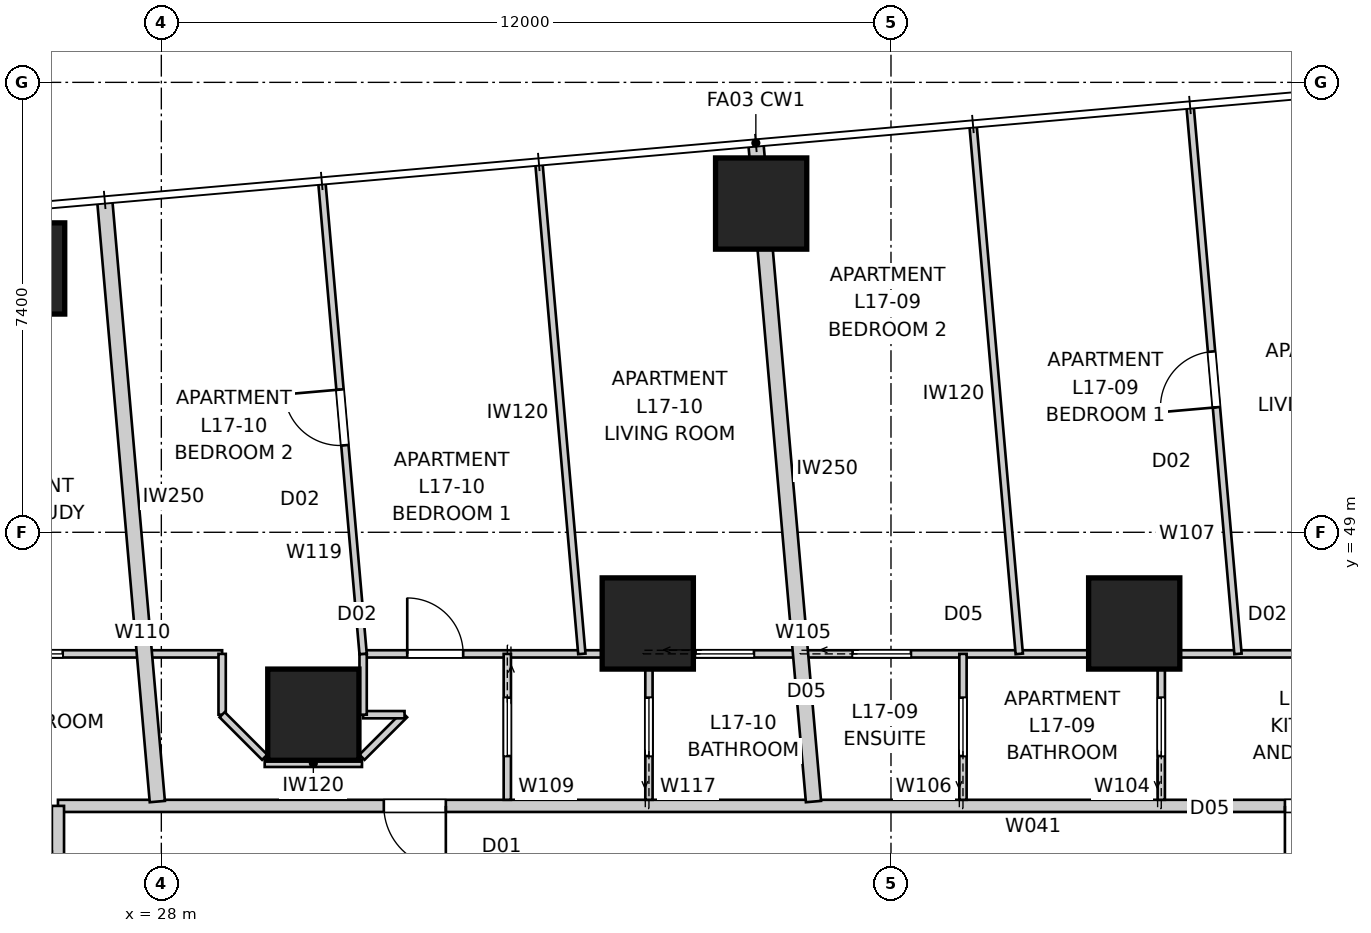
"""IFC4 building model, lengths in metres.
Left out: names, types, materials, properties, quantities, classifications, styles, units other than length and angle.
Written with IfcOpenShell. Run it as: python <this file> out.ifc"""

import sys

from ifc_helpers import new_model, si_unit, direction, frame, frame_2d, origin, origin_2d, place, context, subcontext, project, spatial, rectangle, extrude, element, fill, save


model = new_model("IFC4")
c1 = context("Model", 3, precision=1e-05, world=origin(), true_north=direction((0.0, 1.0)))
c2 = subcontext(c1, "Body", "Model", "MODEL_VIEW")
j1 = project(units=[si_unit("LENGTHUNIT", "METRE"), si_unit("PLANEANGLEUNIT", "RADIAN")], contexts=[c1])
p1 = place(None, origin())
s1 = spatial("IfcSite", under=j1, at=p1, CompositionType="ELEMENT")
p2 = place(p1, origin())
s2 = spatial("IfcBuilding", under=s1, at=p2, CompositionType="ELEMENT")
p3 = place(p2, frame((0.0, 0.0, 64.2)))
s3 = spatial("IfcBuildingStorey", under=s2, at=p3, CompositionType="ELEMENT", Elevation=64.2)
for number, where, z_axis, x_axis in (
    (1, (37.865, 54.407, 0.0), (0.0, 0.0, 1.0), (1.0, 0.0, 0.0)),
    (2, (25.661, 53.339, 0.0), (0.0, 0.0, 1.0), (1.0, 0.0, 0.0)),
    (3, (44.0, 47.5, 0.0), (0.0, 0.0, 1.0), (1.0, 0.0, 0.0)),
    (4, (36.0, 47.5, 0.0), (0.0, 0.0, 1.0), (1.0, 0.0, 0.0)),
    (5, (30.5, 46.0, 0.0), (0.0, 0.0, 1.0), (1.0, 0.0, 0.0)),
):
    element("IfcColumn", number, at=place(p3, frame(where, z_axis=z_axis, x_axis=x_axis)), inside=s3, PredefinedType="COLUMN", context=c2, shape_type="SweptSolid", body=[
        extrude(rectangle(XDim=1.5, YDim=1.5, at=origin_2d()), origin(), (0.0, 0.0, 1.0), 3.4),
    ])
p4 = place(p3, frame((53.7, 44.5, 0.0), z_axis=(0.0, 0.0, 1.0), x_axis=(-1.0, 0.0, 0.0)))
e6 = element("IfcWall", 6, at=p4, inside=s3, PredefinedType="PARTITIONING", context=c2, shape_type="SweptSolid", body=[
    extrude(rectangle(XDim=27.4, YDim=0.2, at=frame_2d((13.7, 0.0))), origin(), (0.0, 0.0, 1.0), 3.25),
])
p5 = place(p4, frame((21.021, 0.0, 0.0)))
e7 = element("IfcOpeningElement", 7, at=p5, cuts=e6, PredefinedType="OPENING", context=c2, shape_type="SweptSolid", body=[
    extrude(rectangle(XDim=1.02, YDim=2.34, at=frame_2d((0.51, 1.17))), frame((0.0, 0.11, 0.0), z_axis=(0.0, -1.0, 0.0), x_axis=(1.0, 0.0, 0.0)), (0.0, 0.0, 1.0), 0.22),
])
p6 = place(p4, frame((6.201, 0.0, 0.0)))
e8 = element("IfcOpeningElement", 8, at=p6, cuts=e6, PredefinedType="OPENING", context=c2, shape_type="SweptSolid", body=[
    extrude(rectangle(XDim=1.02, YDim=2.34, at=frame_2d((0.51, 1.17))), frame((0.0, 0.11, 0.0), z_axis=(0.0, -1.0, 0.0), x_axis=(1.0, 0.0, 0.0)), (0.0, 0.0, 1.0), 0.22),
])
p7 = place(p3, frame((26.3, 44.5, 0.0), z_axis=(0.0, 0.0, 1.0), x_axis=(0.0, -1.0, 0.0)))
e9 = element("IfcWall", 9, at=p7, inside=s3, PredefinedType="PARTITIONING", context=c2, shape_type="SweptSolid", body=[
    extrude(rectangle(XDim=29.0, YDim=0.2, at=frame_2d((14.5, 0.0))), origin(), (0.0, 0.0, 1.0), 3.25),
])
p8 = place(p7, frame((6.85, 0.0, 0.0)))
e10 = element("IfcOpeningElement", 10, at=p8, cuts=e9, PredefinedType="OPENING", context=c2, shape_type="SweptSolid", body=[
    extrude(rectangle(XDim=1.02, YDim=2.34, at=frame_2d((0.51, 1.17))), frame((0.0, 0.11, 0.0), z_axis=(0.0, -1.0, 0.0), x_axis=(1.0, 0.0, 0.0)), (0.0, 0.0, 1.0), 0.22),
])
p9 = place(p7, frame((2.345, 0.0, 0.0)))
e11 = element("IfcOpeningElement", 11, at=p9, cuts=e9, PredefinedType="OPENING", context=c2, shape_type="SweptSolid", body=[
    extrude(rectangle(XDim=1.02, YDim=2.1, at=frame_2d((0.51, 1.05))), frame((0.0, 0.11, 0.0), z_axis=(0.0, -1.0, 0.0), x_axis=(1.0, 0.0, 0.0)), (0.0, 0.0, 1.0), 0.22),
])
p10 = place(p7, frame((17.166, 0.0, 0.0)))
e12 = element("IfcOpeningElement", 12, at=p10, cuts=e9, PredefinedType="OPENING", context=c2, shape_type="SweptSolid", body=[
    extrude(rectangle(XDim=1.02, YDim=2.34, at=frame_2d((0.51, 1.17))), frame((0.0, 0.11, 0.0), z_axis=(0.0, -1.0, 0.0), x_axis=(1.0, 0.0, 0.0)), (0.0, 0.0, 1.0), 0.22),
])
p11 = place(p7, frame((27.055, 0.0, 0.0)))
e13 = element("IfcOpeningElement", 13, at=p11, cuts=e9, PredefinedType="OPENING", context=c2, shape_type="SweptSolid", body=[
    extrude(rectangle(XDim=1.02, YDim=2.34, at=frame_2d((0.51, 1.17))), frame((0.0, 0.11, 0.0), z_axis=(0.0, -1.0, 0.0), x_axis=(1.0, 0.0, 0.0)), (0.0, 0.0, 1.0), 0.22),
])
p12 = place(p3, frame((37.778, 55.403, 0.0), z_axis=(0.0, 0.0, 1.0), x_axis=(0.087140211333, -0.996196056792, 0.0)))
e14 = element("IfcWall", 14, at=p12, inside=s3, PredefinedType="PARTITIONING", context=c2, shape_type="SweptSolid", body=[
    extrude(rectangle(XDim=10.873, YDim=0.25, at=frame_2d((5.437, 0.0))), origin(), (0.0, 0.0, 1.0), 3.25),
])
p13 = place(p3, frame((27.068, 54.466, 0.0), z_axis=(0.0, 0.0, 1.0), x_axis=(0.087157803114, -0.996194517831, 0.0)))
e15 = element("IfcWall", 15, at=p13, inside=s3, PredefinedType="PARTITIONING", context=c2, shape_type="SweptSolid", body=[
    extrude(rectangle(XDim=9.933, YDim=0.25, at=frame_2d((4.966, 0.0))), origin(), (0.0, 0.0, 1.0), 3.25),
])
p14 = place(p3, frame((44.445, 44.6, 0.0), z_axis=(0.0, 0.0, 1.0), x_axis=(0.0, 1.0, 0.0)))
e16 = element("IfcWall", 16, at=p14, inside=s3, PredefinedType="PARTITIONING", context=c2, shape_type="SweptSolid", body=[
    extrude(rectangle(XDim=2.4, YDim=0.12, at=frame_2d((1.2, 0.0))), origin(), (0.0, 0.0, 1.0), 3.25),
])
p15 = place(p14, frame((0.72, 0.0, 0.0)))
e17 = element("IfcOpeningElement", 17, at=p15, cuts=e16, PredefinedType="OPENING", context=c2, shape_type="SweptSolid", body=[
    extrude(rectangle(XDim=0.96, YDim=2.1, at=frame_2d((0.48, 1.05))), frame((0.0, 0.07, 0.0), z_axis=(0.0, -1.0, 0.0), x_axis=(1.0, 0.0, 0.0)), (0.0, 0.0, 1.0), 0.14),
])
p16 = place(p3, frame((31.319, 47.0, 0.0), z_axis=(0.0, 0.0, 1.0), x_axis=(1.0, 0.0, 0.0)))
e18 = element("IfcWall", 18, at=p16, inside=s3, PredefinedType="PARTITIONING", context=c2, shape_type="SweptSolid", body=[
    extrude(rectangle(XDim=17.985, YDim=0.12, at=frame_2d((8.993, 0.0))), origin(), (0.0, 0.0, 1.0), 2.55),
])
p17 = place(p16, frame((0.726, 0.0, 0.0)))
e19 = element("IfcOpeningElement", 19, at=p17, cuts=e18, PredefinedType="OPENING", context=c2, shape_type="SweptSolid", body=[
    extrude(rectangle(XDim=0.92, YDim=2.34, at=frame_2d((0.46, 1.17))), frame((0.0, 0.07, 0.0), z_axis=(0.0, -1.0, 0.0), x_axis=(1.0, 0.0, 0.0)), (0.0, 0.0, 1.0), 0.14),
])
p18 = place(p16, frame((15.701, 0.0, 0.0)))
e20 = element("IfcOpeningElement", 20, at=p18, cuts=e18, PredefinedType="OPENING", context=c2, shape_type="SweptSolid", body=[
    extrude(rectangle(XDim=0.92, YDim=2.34, at=frame_2d((0.46, 1.17))), frame((0.0, 0.07, 0.0), z_axis=(0.0, -1.0, 0.0), x_axis=(1.0, 0.0, 0.0)), (0.0, 0.0, 1.0), 0.14),
])
p19 = place(p16, frame((5.467, 0.0, 0.0)))
e21 = element("IfcOpeningElement", 21, at=p19, cuts=e18, PredefinedType="OPENING", context=c2, shape_type="SweptSolid", body=[
    extrude(rectangle(XDim=0.96, YDim=2.1, at=frame_2d((0.48, 1.05))), frame((0.0, 0.07, 0.0), z_axis=(0.0, -1.0, 0.0), x_axis=(1.0, 0.0, 0.0)), (0.0, 0.0, 1.0), 0.14),
])
p20 = place(p16, frame((8.05, 0.0, 0.0)))
e22 = element("IfcOpeningElement", 22, at=p20, cuts=e18, PredefinedType="OPENING", context=c2, shape_type="SweptSolid", body=[
    extrude(rectangle(XDim=0.96, YDim=2.1, at=frame_2d((0.48, 1.05))), frame((0.0, 0.07, 0.0), z_axis=(0.0, -1.0, 0.0), x_axis=(1.0, 0.0, 0.0)), (0.0, 0.0, 1.0), 0.14),
])
p21 = place(p3, frame((41.184, 44.6, 0.0), z_axis=(0.0, 0.0, 1.0), x_axis=(0.0, 1.0, 0.0)))
e23 = element("IfcWall", 23, at=p21, inside=s3, PredefinedType="PARTITIONING", context=c2, shape_type="SweptSolid", body=[
    extrude(rectangle(XDim=2.4, YDim=0.12, at=frame_2d((1.2, 0.0))), origin(), (0.0, 0.0, 1.0), 3.25),
])
p22 = place(p21, frame((0.72, 0.0, 0.0)))
e24 = element("IfcOpeningElement", 24, at=p22, cuts=e23, PredefinedType="OPENING", context=c2, shape_type="SweptSolid", body=[
    extrude(rectangle(XDim=0.96, YDim=2.1, at=frame_2d((0.48, 1.05))), frame((0.0, 0.07, 0.0), z_axis=(0.0, -1.0, 0.0), x_axis=(1.0, 0.0, 0.0)), (0.0, 0.0, 1.0), 0.14),
])
p23 = place(p3, frame((45.707, 47.0, 0.0), z_axis=(0.0, 0.0, 1.0), x_axis=(-0.087160907995, 0.996194246178, 0.0)))
e25 = element("IfcWall", 25, at=p23, inside=s3, PredefinedType="PARTITIONING", context=c2, shape_type="SweptSolid", body=[
    extrude(rectangle(XDim=9.022, YDim=0.12, at=frame_2d((4.511, 0.0))), origin(), (0.0, 0.0, 1.0), 3.25),
])
p24 = place(p23, frame((4.071, 0.0, 0.0)))
e26 = element("IfcOpeningElement", 26, at=p24, cuts=e25, PredefinedType="OPENING", context=c2, shape_type="SweptSolid", body=[
    extrude(rectangle(XDim=0.92, YDim=2.34, at=frame_2d((0.46, 1.17))), frame((0.0, 0.07, 0.0), z_axis=(0.0, -1.0, 0.0), x_axis=(1.0, 0.0, 0.0)), (0.0, 0.0, 1.0), 0.14),
])
p25 = place(p3, frame((42.11, 47.0, 0.0), z_axis=(0.0, 0.0, 1.0), x_axis=(-0.087158256162, 0.996194478193, 0.0)))
e27 = element("IfcWall", 27, at=p25, inside=s3, PredefinedType="PARTITIONING", context=c2, shape_type="SweptSolid", body=[
    extrude(rectangle(XDim=8.709, YDim=0.12, at=frame_2d((4.354, 0.0))), origin(), (0.0, 0.0, 1.0), 3.25),
])
p26 = place(p3, frame((33.69, 47.0, 0.0), z_axis=(0.0, 0.0, 1.0), x_axis=(0.0, -1.0, 0.0)))
e28 = element("IfcWall", 28, at=p26, inside=s3, PredefinedType="PARTITIONING", context=c2, shape_type="SweptSolid", body=[
    extrude(rectangle(XDim=2.4, YDim=0.12, at=frame_2d((1.2, 0.0))), origin(), (0.0, 0.0, 1.0), 3.25),
])
p27 = place(p26, frame((0.72, 0.0, 0.0)))
e29 = element("IfcOpeningElement", 29, at=p27, cuts=e28, PredefinedType="OPENING", context=c2, shape_type="SweptSolid", body=[
    extrude(rectangle(XDim=0.96, YDim=2.1, at=frame_2d((0.48, 1.05))), frame((0.0, 0.07, 0.0), z_axis=(0.0, -1.0, 0.0), x_axis=(1.0, 0.0, 0.0)), (0.0, 0.0, 1.0), 0.14),
])
p28 = place(p3, frame((23.8, 47.0, 0.0), z_axis=(0.0, 0.0, 1.0), x_axis=(1.0, 0.0, 0.0)))
e30 = element("IfcWall", 30, at=p28, inside=s3, PredefinedType="PARTITIONING", context=c2, shape_type="SweptSolid", body=[
    extrude(rectangle(XDim=5.2, YDim=0.12, at=frame_2d((2.6, 0.0))), origin(), (0.0, 0.0, 1.0), 3.25),
])
p29 = place(p28, frame((1.618, 0.0, 0.0)))
e31 = element("IfcOpeningElement", 31, at=p29, cuts=e30, PredefinedType="OPENING", context=c2, shape_type="SweptSolid", body=[
    extrude(rectangle(XDim=0.96, YDim=2.1, at=frame_2d((0.48, 1.05))), frame((0.0, 0.07, 0.0), z_axis=(0.0, -1.0, 0.0), x_axis=(1.0, 0.0, 0.0)), (0.0, 0.0, 1.0), 0.14),
])
p30 = place(p3, frame((29.0, 47.0, 0.0), z_axis=(0.0, 0.0, 1.0), x_axis=(0.0, -1.0, 0.0)))
e32 = element("IfcWall", 32, at=p30, inside=s3, PredefinedType="PARTITIONING", context=c2, shape_type="SweptSolid", body=[
    extrude(rectangle(XDim=1.0, YDim=0.12, at=frame_2d((0.5, 0.0))), origin(), (0.0, 0.0, 1.0), 3.25),
])
p31 = place(p3, frame((29.0, 46.0, 0.0), z_axis=(0.0, 0.0, 1.0), x_axis=(0.707106781187, -0.707106781187, 0.0)))
e33 = element("IfcWall", 33, at=p31, inside=s3, PredefinedType="PARTITIONING", context=c2, shape_type="SweptSolid", body=[
    extrude(rectangle(XDim=0.99, YDim=0.12, at=frame_2d((0.495, 0.0))), origin(), (0.0, 0.0, 1.0), 3.25),
])
p32 = place(p3, frame((29.7, 45.2, 0.0), z_axis=(0.0, 0.0, 1.0), x_axis=(1.0, 0.0, 0.0)))
e34 = element("IfcWall", 34, at=p32, inside=s3, PredefinedType="PARTITIONING", context=c2, shape_type="SweptSolid", body=[
    extrude(rectangle(XDim=1.6, YDim=0.12, at=frame_2d((0.8, 0.0))), origin(), (0.0, 0.0, 1.0), 3.25),
])
p33 = place(p3, frame((31.3, 45.3, 0.0), z_axis=(0.0, 0.0, 1.0), x_axis=(0.707106781187, 0.707106781187, 0.0)))
e35 = element("IfcWall", 35, at=p33, inside=s3, PredefinedType="PARTITIONING", context=c2, shape_type="SweptSolid", body=[
    extrude(rectangle(XDim=0.99, YDim=0.12, at=frame_2d((0.495, 0.0))), origin(), (0.0, 0.0, 1.0), 3.25),
])
p34 = place(p3, frame((32.0, 46.0, 0.0), z_axis=(0.0, 0.0, 1.0), x_axis=(-1.0, 0.0, 0.0)))
e36 = element("IfcWall", 36, at=p34, inside=s3, PredefinedType="PARTITIONING", context=c2, shape_type="SweptSolid", body=[
    extrude(rectangle(XDim=0.681, YDim=0.12, at=frame_2d((0.341, 0.0))), origin(), (0.0, 0.0, 1.0), 3.25),
])
p35 = place(p3, frame((31.319, 46.0, 0.0), z_axis=(0.0, 0.0, 1.0), x_axis=(0.0, 1.0, 0.0)))
e37 = element("IfcWall", 37, at=p35, inside=s3, PredefinedType="PARTITIONING", context=c2, shape_type="SweptSolid", body=[
    extrude(rectangle(XDim=1.0, YDim=0.12, at=frame_2d((0.5, 0.0))), origin(), (0.0, 0.0, 1.0), 3.25),
])
p36 = place(p3, frame((36.019, 44.6, 0.0), z_axis=(0.0, 0.0, 1.0), x_axis=(0.0, 1.0, 0.0)))
e38 = element("IfcWall", 38, at=p36, inside=s3, PredefinedType="PARTITIONING", context=c2, shape_type="SweptSolid", body=[
    extrude(rectangle(XDim=2.4, YDim=0.12, at=frame_2d((1.2, 0.0))), origin(), (0.0, 0.0, 1.0), 3.25),
])
p37 = place(p36, frame((0.72, 0.0, 0.0)))
e39 = element("IfcOpeningElement", 39, at=p37, cuts=e38, PredefinedType="OPENING", context=c2, shape_type="SweptSolid", body=[
    extrude(rectangle(XDim=0.96, YDim=2.1, at=frame_2d((0.48, 1.05))), frame((0.0, 0.07, 0.0), z_axis=(0.0, -1.0, 0.0), x_axis=(1.0, 0.0, 0.0)), (0.0, 0.0, 1.0), 0.14),
])
p38 = place(p3, frame((34.916, 47.0, 0.0), z_axis=(0.0, 0.0, 1.0), x_axis=(-0.087184938313, 0.99619214338, 0.0)))
e40 = element("IfcWall", 40, at=p38, inside=s3, PredefinedType="PARTITIONING", context=c2, shape_type="SweptSolid", body=[
    extrude(rectangle(XDim=8.082, YDim=0.12, at=frame_2d((4.041, 0.0))), origin(), (0.0, 0.0, 1.0), 3.25),
])
p39 = place(p3, frame((31.319, 47.0, 0.0), z_axis=(0.0, 0.0, 1.0), x_axis=(-0.0871517452, 0.996195047824, 0.0)))
e41 = element("IfcWall", 41, at=p39, inside=s3, PredefinedType="PARTITIONING", context=c2, shape_type="SweptSolid", body=[
    extrude(rectangle(XDim=7.768, YDim=0.12, at=frame_2d((3.884, 0.0))), origin(), (0.0, 0.0, 1.0), 3.25),
])
p40 = place(p39, frame((3.444, 0.0, 0.0)))
e42 = element("IfcOpeningElement", 42, at=p40, cuts=e41, PredefinedType="OPENING", context=c2, shape_type="SweptSolid", body=[
    extrude(rectangle(XDim=0.92, YDim=2.34, at=frame_2d((0.46, 1.17))), frame((0.0, 0.07, 0.0), z_axis=(0.0, -1.0, 0.0), x_axis=(1.0, 0.0, 0.0)), (0.0, 0.0, 1.0), 0.14),
])
p41 = place(p3, frame((23.8, 43.69, 0.0), z_axis=(0.0, 0.0, 1.0), x_axis=(1.0, 0.0, 0.0)))
e43 = element("IfcWall", 43, at=p41, inside=s3, PredefinedType="PARTITIONING", context=c2, shape_type="SweptSolid", body=[
    extrude(rectangle(XDim=2.4, YDim=0.12, at=frame_2d((1.2, 0.0))), origin(), (0.0, 0.0, 1.0), 3.25),
])
p42 = place(p41, frame((0.72, 0.0, 0.0)))
e44 = element("IfcOpeningElement", 44, at=p42, cuts=e43, PredefinedType="OPENING", context=c2, shape_type="SweptSolid", body=[
    extrude(rectangle(XDim=0.96, YDim=2.1, at=frame_2d((0.48, 1.05))), frame((0.0, 0.07, 0.0), z_axis=(0.0, -1.0, 0.0), x_axis=(1.0, 0.0, 0.0)), (0.0, 0.0, 1.0), 0.14),
])
p43 = place(p5, origin())
e45 = element("IfcDoor", 45, at=p43, inside=s3, OperationType="SINGLE_SWING_LEFT", PredefinedType="DOOR", context=c2, shape_type="SweptSolid", body=[
    extrude(rectangle(XDim=1.02, YDim=2.34, at=frame_2d((0.51, 1.17))), frame((0.0, 0.025, 0.0), z_axis=(0.0, -1.0, 0.0), x_axis=(1.0, 0.0, 0.0)), (0.0, 0.0, 1.0), 0.05),
])
fill(e7, e45)
p44 = place(p6, origin())
e46 = element("IfcDoor", 46, at=p44, inside=s3, OperationType="SINGLE_SWING_RIGHT", PredefinedType="DOOR", context=c2, shape_type="SweptSolid", body=[
    extrude(rectangle(XDim=1.02, YDim=2.34, at=frame_2d((0.51, 1.17))), frame((0.0, 0.025, 0.0), z_axis=(0.0, -1.0, 0.0), x_axis=(1.0, 0.0, 0.0)), (0.0, 0.0, 1.0), 0.05),
])
fill(e8, e46)
p45 = place(p27, origin())
e47 = element("IfcDoor", 47, at=p45, inside=s3, OperationType="SLIDING_TO_LEFT", PredefinedType="DOOR", context=c2, shape_type="SweptSolid", body=[
    extrude(rectangle(XDim=0.96, YDim=2.1, at=frame_2d((0.48, 1.05))), frame((0.0, 0.025, 0.0), z_axis=(0.0, -1.0, 0.0), x_axis=(1.0, 0.0, 0.0)), (0.0, 0.0, 1.0), 0.05),
])
fill(e29, e47)
p46 = place(p17, origin())
e48 = element("IfcDoor", 48, at=p46, inside=s3, OperationType="SINGLE_SWING_LEFT", PredefinedType="DOOR", context=c2, shape_type="SweptSolid", body=[
    extrude(rectangle(XDim=0.92, YDim=2.34, at=frame_2d((0.46, 1.17))), frame((0.0, 0.025, 0.0), z_axis=(0.0, -1.0, 0.0), x_axis=(1.0, 0.0, 0.0)), (0.0, 0.0, 1.0), 0.05),
])
fill(e19, e48)
p47 = place(p15, origin())
e49 = element("IfcDoor", 49, at=p47, inside=s3, OperationType="SLIDING_TO_LEFT", PredefinedType="DOOR", context=c2, shape_type="SweptSolid", body=[
    extrude(rectangle(XDim=0.96, YDim=2.1, at=frame_2d((0.48, 1.05))), frame((0.0, 0.025, 0.0), z_axis=(0.0, -1.0, 0.0), x_axis=(1.0, 0.0, 0.0)), (0.0, 0.0, 1.0), 0.05),
])
fill(e17, e49)
p48 = place(p37, origin())
e50 = element("IfcDoor", 50, at=p48, inside=s3, OperationType="SLIDING_TO_LEFT", PredefinedType="DOOR", context=c2, shape_type="SweptSolid", body=[
    extrude(rectangle(XDim=0.96, YDim=2.1, at=frame_2d((0.48, 1.05))), frame((0.0, 0.025, 0.0), z_axis=(0.0, -1.0, 0.0), x_axis=(1.0, 0.0, 0.0)), (0.0, 0.0, 1.0), 0.05),
])
fill(e39, e50)
p49 = place(p24, origin())
e51 = element("IfcDoor", 51, at=p49, inside=s3, OperationType="SINGLE_SWING_LEFT", PredefinedType="DOOR", context=c2, shape_type="SweptSolid", body=[
    extrude(rectangle(XDim=0.92, YDim=2.34, at=frame_2d((0.46, 1.17))), frame((0.0, 0.025, 0.0), z_axis=(0.0, -1.0, 0.0), x_axis=(1.0, 0.0, 0.0)), (0.0, 0.0, 1.0), 0.05),
])
fill(e26, e51)
p50 = place(p22, origin())
e52 = element("IfcDoor", 52, at=p50, inside=s3, OperationType="SLIDING_TO_LEFT", PredefinedType="DOOR", context=c2, shape_type="SweptSolid", body=[
    extrude(rectangle(XDim=0.96, YDim=2.1, at=frame_2d((0.48, 1.05))), frame((0.0, 0.025, 0.0), z_axis=(0.0, -1.0, 0.0), x_axis=(1.0, 0.0, 0.0)), (0.0, 0.0, 1.0), 0.05),
])
fill(e24, e52)
p51 = place(p29, origin())
e53 = element("IfcDoor", 53, at=p51, inside=s3, OperationType="SLIDING_TO_LEFT", PredefinedType="DOOR", context=c2, shape_type="SweptSolid", body=[
    extrude(rectangle(XDim=0.96, YDim=2.1, at=frame_2d((0.48, 1.05))), frame((0.0, 0.025, 0.0), z_axis=(0.0, -1.0, 0.0), x_axis=(1.0, 0.0, 0.0)), (0.0, 0.0, 1.0), 0.05),
])
fill(e31, e53)
p52 = place(p19, origin())
e54 = element("IfcDoor", 54, at=p52, inside=s3, OperationType="SLIDING_TO_LEFT", PredefinedType="DOOR", context=c2, shape_type="SweptSolid", body=[
    extrude(rectangle(XDim=0.96, YDim=2.1, at=frame_2d((0.48, 1.05))), frame((0.0, 0.025, 0.0), z_axis=(0.0, -1.0, 0.0), x_axis=(1.0, 0.0, 0.0)), (0.0, 0.0, 1.0), 0.05),
])
fill(e21, e54)
p53 = place(p20, origin())
e55 = element("IfcDoor", 55, at=p53, inside=s3, OperationType="SLIDING_TO_LEFT", PredefinedType="DOOR", context=c2, shape_type="SweptSolid", body=[
    extrude(rectangle(XDim=0.96, YDim=2.1, at=frame_2d((0.48, 1.05))), frame((0.0, 0.025, 0.0), z_axis=(0.0, -1.0, 0.0), x_axis=(1.0, 0.0, 0.0)), (0.0, 0.0, 1.0), 0.05),
])
fill(e22, e55)
p54 = place(p40, origin())
e56 = element("IfcDoor", 56, at=p54, inside=s3, OperationType="SINGLE_SWING_RIGHT", PredefinedType="DOOR", context=c2, shape_type="SweptSolid", body=[
    extrude(rectangle(XDim=0.92, YDim=2.34, at=frame_2d((0.46, 1.17))), frame((0.0, 0.025, 0.0), z_axis=(0.0, -1.0, 0.0), x_axis=(1.0, 0.0, 0.0)), (0.0, 0.0, 1.0), 0.05),
])
fill(e42, e56)
save(model, sys.argv[1])
